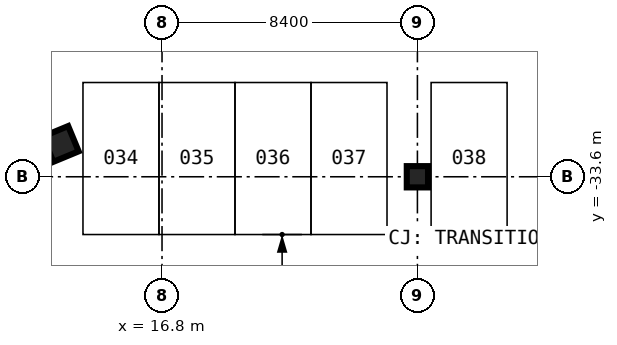
"""IFC4 building model, lengths in metres.
Left out: names, types, materials, properties, quantities, classifications, styles, units other than length and angle.
Written with IfcOpenShell. Run it as: python <this file> out.ifc"""

import sys

from ifc_helpers import new_model, si_unit, direction, frame, origin, origin_2d, place, context, subcontext, project, spatial, rectangle, extrude, element, save


model = new_model("IFC4")
c1 = context("Model", 3, precision=1e-05, world=origin(), true_north=direction((0.0, 1.0)))
c2 = subcontext(c1, "Body", "Model", "MODEL_VIEW")
j1 = project(units=[si_unit("LENGTHUNIT", "METRE"), si_unit("PLANEANGLEUNIT", "RADIAN")], contexts=[c1])
p1 = place(None, origin())
s1 = spatial("IfcSite", under=j1, at=p1, CompositionType="ELEMENT")
p2 = place(p1, origin())
s2 = spatial("IfcBuilding", under=s1, at=p2, CompositionType="ELEMENT")
p3 = place(p2, frame((0.0, 0.0, -9.0)))
s3 = spatial("IfcBuildingStorey", under=s2, at=p3, CompositionType="ELEMENT", Elevation=-9.0)
p4 = place(p3, frame((25.2, -33.6, 0.0), z_axis=(0.0, 0.0, 1.0), x_axis=(1.0, 0.0, 0.0)))
e1 = element("IfcColumn", 1, at=p4, inside=s3, PredefinedType="COLUMN", context=c2, shape_type="SweptSolid", body=[
    extrude(rectangle(XDim=0.7, YDim=0.7, at=origin_2d()), origin(), (0.0, 0.0, 1.0), 4.5),
])
p5 = place(p3, frame((13.47, -32.521, 0.0), z_axis=(0.0, 0.0, 1.0), x_axis=(0.382683432365, -0.923879532511, 0.0)))
e2 = element("IfcColumn", 2, at=p5, inside=s3, PredefinedType="COLUMN", context=c2, shape_type="SweptSolid", body=[
    extrude(rectangle(XDim=0.9, YDim=0.9, at=origin_2d()), origin(), (0.0, 0.0, 1.0), 4.5),
])
save(model, sys.argv[1])
